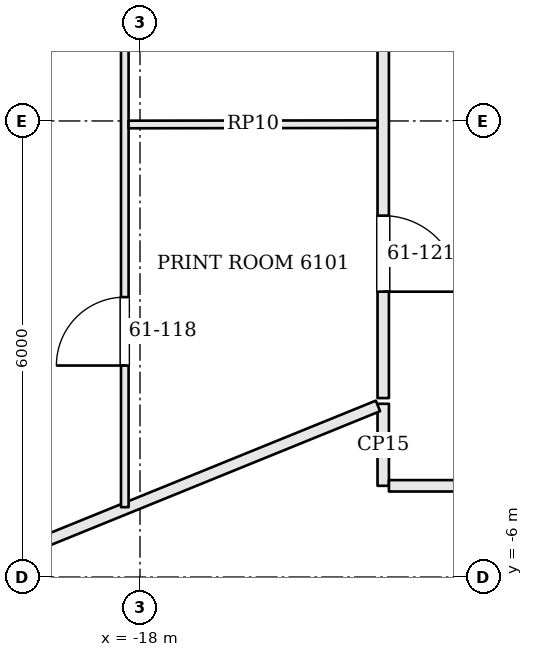
"""IFC4 building model, lengths in metres.
Left out: names, types, materials, properties, quantities, classifications, styles, units other than length and angle.
Written with IfcOpenShell. Run it as: python <this file> out.ifc"""

import sys

from ifc_helpers import new_model, si_unit, direction, frame, frame_2d, origin, place, context, subcontext, project, spatial, rectangle, extrude, element, fill, save


model = new_model("IFC4")
c1 = context("Model", 3, precision=1e-05, world=origin(), true_north=direction((0.0, 1.0)))
c2 = subcontext(c1, "Body", "Model", "MODEL_VIEW")
j1 = project(units=[si_unit("LENGTHUNIT", "METRE"), si_unit("PLANEANGLEUNIT", "RADIAN")], contexts=[c1])
p1 = place(None, origin())
s1 = spatial("IfcSite", under=j1, at=p1, CompositionType="ELEMENT")
p2 = place(p1, origin())
s2 = spatial("IfcBuilding", under=s1, at=p2, CompositionType="ELEMENT")
p3 = place(p2, frame((0.0, 0.0, 248.7)))
s3 = spatial("IfcBuildingStorey", under=s2, at=p3, CompositionType="ELEMENT", Elevation=248.7)
p4 = place(p3, frame((-14.8, -3.721, 0.0), z_axis=(0.0, 0.0, 1.0), x_axis=(0.0, -1.0, 0.0)))
e1 = element("IfcWall", 1, at=p4, inside=s3, PredefinedType="PARTITIONING", context=c2, shape_type="SweptSolid", body=[
    extrude(rectangle(XDim=1.079, YDim=0.15, at=frame_2d((0.54, 0.0))), origin(), (0.0, 0.0, 1.0), 3.084),
])
p5 = place(p3, frame((-14.725, -4.8, 0.0), z_axis=(0.0, 0.0, 1.0), x_axis=(1.0, 0.0, 0.0)))
e2 = element("IfcWall", 2, at=p5, inside=s3, PredefinedType="PARTITIONING", context=c2, shape_type="SweptSolid", body=[
    extrude(rectangle(XDim=10.206, YDim=0.15, at=frame_2d((5.103, 0.0))), origin(), (0.0, 0.0, 1.0), 3.084),
])
p6 = place(p5, frame((3.626, 0.0, 0.0)))
e3 = element("IfcOpeningElement", 3, at=p6, cuts=e2, PredefinedType="OPENING", context=c2, shape_type="SweptSolid", body=[
    extrude(rectangle(XDim=1.8, YDim=2.1, at=frame_2d((0.9, 1.05))), frame((0.0, 0.085, 0.0), z_axis=(0.0, -1.0, 0.0), x_axis=(1.0, 0.0, 0.0)), (0.0, 0.0, 1.0), 0.17),
])
p7 = place(p3, frame((-24.574, -7.692, 0.0), z_axis=(0.0, 0.0, 1.0), x_axis=(0.926449052431, 0.376420181777, 0.0)))
e4 = element("IfcWall", 4, at=p7, inside=s3, PredefinedType="PARTITIONING", context=c2, shape_type="SweptSolid", body=[
    extrude(rectangle(XDim=10.475, YDim=0.15, at=frame_2d((5.238, 0.0))), origin(), (0.0, 0.0, 1.0), 3.084),
])
p8 = place(p3, frame((-14.8, 11.604, 0.0), z_axis=(0.0, 0.0, 1.0), x_axis=(0.0, -1.0, 0.0)))
e5 = element("IfcWall", 5, at=p8, inside=s3, PredefinedType="PARTITIONING", context=c2, shape_type="SweptSolid", body=[
    extrude(rectangle(XDim=15.25, YDim=0.15, at=frame_2d((7.625, 0.0))), origin(), (0.0, 0.0, 1.0), 3.084),
])
p9 = place(p8, frame((1.501, 0.0, 0.0)))
e6 = element("IfcOpeningElement", 6, at=p9, cuts=e5, PredefinedType="OPENING", context=c2, shape_type="SweptSolid", body=[
    extrude(rectangle(XDim=1.0, YDim=2.1, at=frame_2d((0.5, 1.05))), frame((0.0, 0.085, 0.0), z_axis=(0.0, -1.0, 0.0), x_axis=(1.0, 0.0, 0.0)), (0.0, 0.0, 1.0), 0.17),
])
p10 = place(p8, frame((5.535, 0.0, 0.0)))
e7 = element("IfcOpeningElement", 7, at=p10, cuts=e5, PredefinedType="OPENING", context=c2, shape_type="SweptSolid", body=[
    extrude(rectangle(XDim=1.0, YDim=2.4, at=frame_2d((0.5, 1.2))), frame((0.0, 0.085, 0.0), z_axis=(0.0, -1.0, 0.0), x_axis=(1.0, 0.0, 0.0)), (0.0, 0.0, 1.0), 0.17),
])
p11 = place(p8, frame((9.35, 0.0, 0.0)))
e8 = element("IfcOpeningElement", 8, at=p11, cuts=e5, PredefinedType="OPENING", context=c2, shape_type="SweptSolid", body=[
    extrude(rectangle(XDim=1.0, YDim=2.1, at=frame_2d((0.5, 1.05))), frame((0.0, 0.085, 0.0), z_axis=(0.0, -1.0, 0.0), x_axis=(1.0, 0.0, 0.0)), (0.0, 0.0, 1.0), 0.17),
])
p12 = place(p8, frame((12.85, 0.0, 0.0)))
e9 = element("IfcOpeningElement", 9, at=p12, cuts=e5, PredefinedType="OPENING", context=c2, shape_type="SweptSolid", body=[
    extrude(rectangle(XDim=1.0, YDim=2.1, at=frame_2d((0.5, 1.05))), frame((0.0, 0.085, 0.0), z_axis=(0.0, -1.0, 0.0), x_axis=(1.0, 0.0, 0.0)), (0.0, 0.0, 1.0), 0.17),
])
p13 = place(p3, frame((-18.2, -5.081, 0.0), z_axis=(0.0, 0.0, 1.0), x_axis=(0.0, 1.0, 0.0)))
e10 = element("IfcWall", 10, at=p13, inside=s3, PredefinedType="PARTITIONING", context=c2, shape_type="SweptSolid", body=[
    extrude(rectangle(XDim=19.932, YDim=0.1, at=frame_2d((9.966, 0.0))), origin(), (0.0, 0.0, 1.0), 3.084),
])
p14 = place(p13, frame((6.707, 0.0, 0.0)))
e11 = element("IfcOpeningElement", 11, at=p14, cuts=e10, PredefinedType="OPENING", context=c2, shape_type="SweptSolid", body=[
    extrude(rectangle(XDim=0.9, YDim=2.1, at=frame_2d((0.45, 1.05))), frame((0.0, 0.06, 0.0), z_axis=(0.0, -1.0, 0.0), x_axis=(1.0, 0.0, 0.0)), (0.0, 0.0, 1.0), 0.12),
])
p15 = place(p13, frame((1.863, 0.0, 0.0)))
e12 = element("IfcOpeningElement", 12, at=p15, cuts=e10, PredefinedType="OPENING", context=c2, shape_type="SweptSolid", body=[
    extrude(rectangle(XDim=0.9, YDim=2.1, at=frame_2d((0.45, 1.05))), frame((0.0, 0.06, 0.0), z_axis=(0.0, -1.0, 0.0), x_axis=(1.0, 0.0, 0.0)), (0.0, 0.0, 1.0), 0.12),
])
p16 = place(p3, frame((-14.875, -0.042, 0.0), z_axis=(0.0, 0.0, 1.0), x_axis=(-0.999999196935, -0.00126733162, 0.0)))
e13 = element("IfcWall", 13, at=p16, inside=s3, PredefinedType="PARTITIONING", context=c2, shape_type="SweptSolid", body=[
    extrude(rectangle(XDim=3.275, YDim=0.1, at=frame_2d((1.637, 0.0))), origin(), (0.0, 0.0, 1.0), 3.084),
])
p17 = place(p15, origin())
e14 = element("IfcDoor", 14, at=p17, inside=s3, OperationType="SINGLE_SWING_LEFT", PredefinedType="DOOR", context=c2, shape_type="SweptSolid", body=[
    extrude(rectangle(XDim=0.9, YDim=2.1, at=frame_2d((0.45, 1.05))), frame((0.0, 0.025, 0.0), z_axis=(0.0, -1.0, 0.0), x_axis=(1.0, 0.0, 0.0)), (0.0, 0.0, 1.0), 0.05),
])
fill(e12, e14)
p18 = place(p12, origin())
e15 = element("IfcDoor", 15, at=p18, inside=s3, OperationType="SINGLE_SWING_RIGHT", PredefinedType="DOOR", context=c2, shape_type="SweptSolid", body=[
    extrude(rectangle(XDim=1.0, YDim=2.1, at=frame_2d((0.5, 1.05))), frame((0.0, 0.025, 0.0), z_axis=(0.0, -1.0, 0.0), x_axis=(1.0, 0.0, 0.0)), (0.0, 0.0, 1.0), 0.05),
])
fill(e9, e15)
save(model, sys.argv[1])
